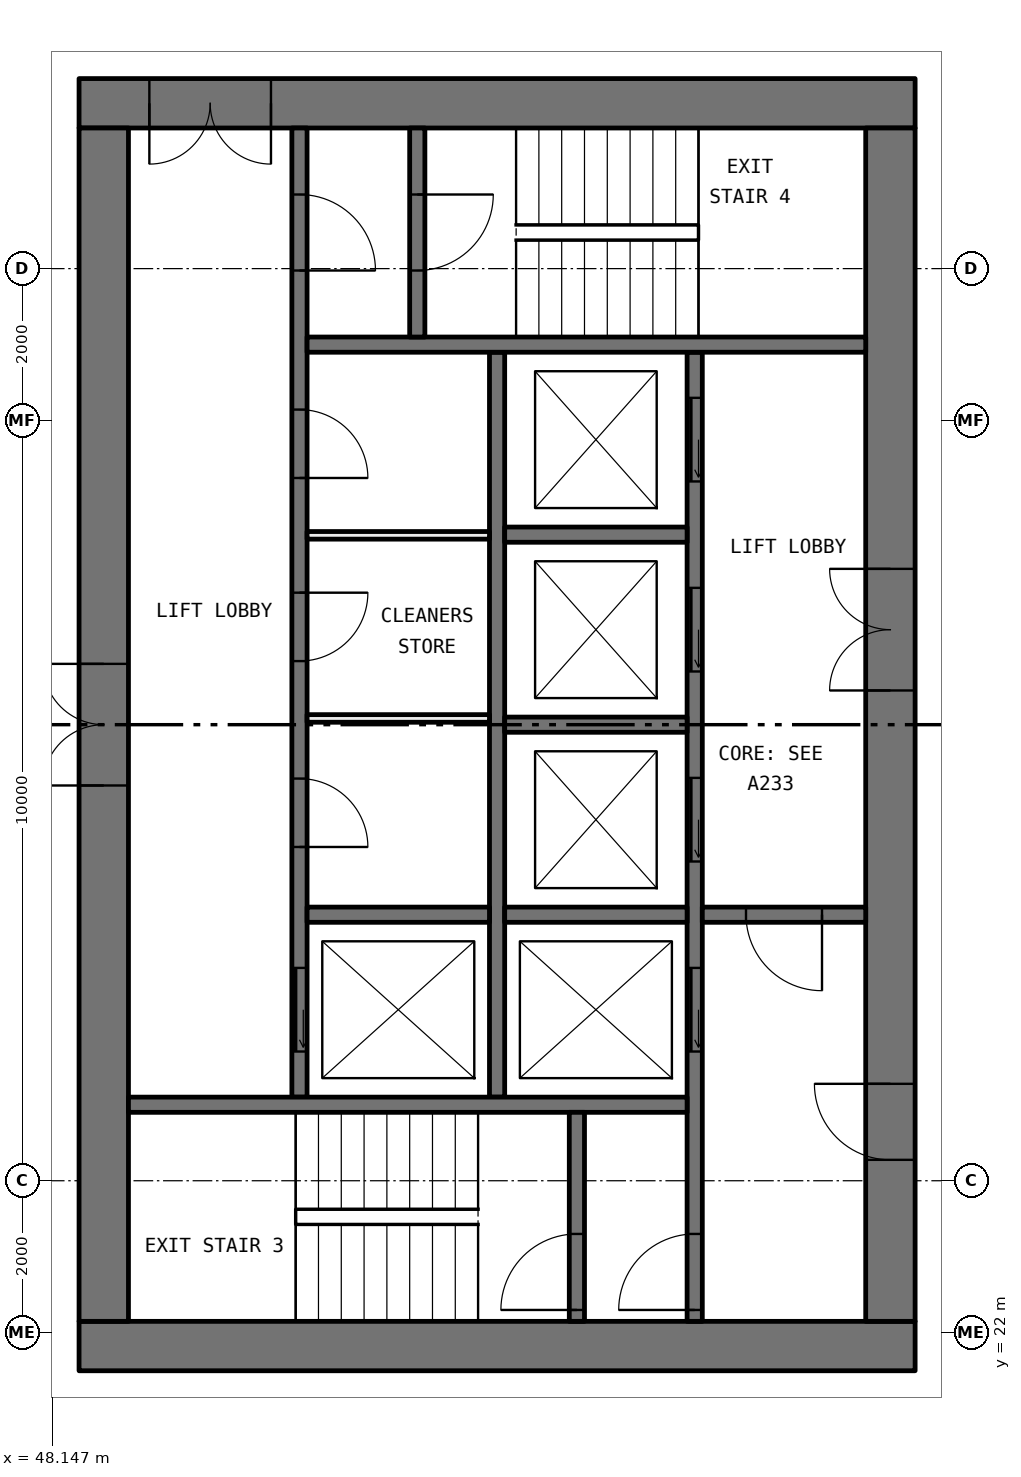
"""IFC4 building model, lengths in metres.
Left out: names, types, materials, properties, quantities, classifications, styles, units other than length and angle.
Written with IfcOpenShell. Run it as: python <this file> out.ifc"""

import sys

from ifc_helpers import new_model, si_unit, direction, frame, frame_2d, origin, place, context, subcontext, project, spatial, rectangle, extrude, element, fill, save


model = new_model("IFC4")
c1 = context("Model", 3, precision=1e-05, world=origin(), true_north=direction((0.0, 1.0)))
c2 = subcontext(c1, "Body", "Model", "MODEL_VIEW")
j1 = project(units=[si_unit("LENGTHUNIT", "METRE"), si_unit("PLANEANGLEUNIT", "RADIAN")], contexts=[c1])
p1 = place(None, origin())
s1 = spatial("IfcSite", under=j1, at=p1, CompositionType="ELEMENT")
p2 = place(p1, origin())
s2 = spatial("IfcBuilding", under=s1, at=p2, CompositionType="ELEMENT")
p3 = place(p2, frame((0.0, 0.0, 124.2)))
s3 = spatial("IfcBuildingStorey", under=s2, at=p3, CompositionType="ELEMENT", Elevation=124.2)
p4 = place(p3, frame((59.5, 21.825, 0.0), z_axis=(0.0, 0.0, 1.0), x_axis=(-1.0, 0.0, 0.0)))
e1 = element("IfcWall", 1, at=p4, inside=s3, PredefinedType="SHEAR", context=c2, shape_type="SweptSolid", body=[
    extrude(rectangle(XDim=11.0, YDim=0.65, at=frame_2d((5.5, 0.0))), origin(), (0.0, 0.0, 1.0), 3.05),
])
p5 = place(p3, frame((59.5, 38.175, 0.0), z_axis=(0.0, 0.0, 1.0), x_axis=(-1.0, 0.0, 0.0)))
e2 = element("IfcWall", 2, at=p5, inside=s3, PredefinedType="SHEAR", context=c2, shape_type="SweptSolid", body=[
    extrude(rectangle(XDim=11.0, YDim=0.65, at=frame_2d((5.5, 0.0))), origin(), (0.0, 0.0, 1.0), 3.05),
])
p6 = place(p5, frame((8.475, 0.0, 0.0)))
e3 = element("IfcOpeningElement", 3, at=p6, cuts=e2, PredefinedType="OPENING", context=c2, shape_type="SweptSolid", body=[
    extrude(rectangle(XDim=1.6, YDim=2.1, at=frame_2d((0.8, 1.05))), frame((0.0, 0.335, 0.0), z_axis=(0.0, -1.0, 0.0), x_axis=(1.0, 0.0, 0.0)), (0.0, 0.0, 1.0), 0.67),
])
p7 = place(p3, frame((59.175, 22.15, 0.0), z_axis=(0.0, 0.0, 1.0), x_axis=(0.0, 1.0, 0.0)))
e4 = element("IfcWall", 4, at=p7, inside=s3, PredefinedType="SHEAR", context=c2, shape_type="SweptSolid", body=[
    extrude(rectangle(XDim=15.7, YDim=0.65, at=frame_2d((7.85, 0.0))), origin(), (0.0, 0.0, 1.0), 3.05),
])
p8 = place(p7, frame((8.3, 0.0, 0.0)))
e5 = element("IfcOpeningElement", 5, at=p8, cuts=e4, PredefinedType="OPENING", context=c2, shape_type="SweptSolid", body=[
    extrude(rectangle(XDim=1.6, YDim=2.1, at=frame_2d((0.8, 1.05))), frame((0.0, 0.335, 0.0), z_axis=(0.0, -1.0, 0.0), x_axis=(1.0, 0.0, 0.0)), (0.0, 0.0, 1.0), 0.67),
])
p9 = place(p7, frame((2.125, 0.0, 0.0)))
e6 = element("IfcOpeningElement", 6, at=p9, cuts=e4, PredefinedType="OPENING", context=c2, shape_type="SweptSolid", body=[
    extrude(rectangle(XDim=1.0, YDim=2.1, at=frame_2d((0.5, 1.05))), frame((0.0, 0.335, 0.0), z_axis=(0.0, -1.0, 0.0), x_axis=(1.0, 0.0, 0.0)), (0.0, 0.0, 1.0), 0.67),
])
p10 = place(p3, frame((48.825, 22.15, 0.0), z_axis=(0.0, 0.0, 1.0), x_axis=(0.0, 1.0, 0.0)))
e7 = element("IfcWall", 7, at=p10, inside=s3, PredefinedType="SHEAR", context=c2, shape_type="SweptSolid", body=[
    extrude(rectangle(XDim=15.7, YDim=0.65, at=frame_2d((7.85, 0.0))), origin(), (0.0, 0.0, 1.0), 3.05),
])
p11 = place(p10, frame((7.05, 0.0, 0.0)))
e8 = element("IfcOpeningElement", 8, at=p11, cuts=e7, PredefinedType="OPENING", context=c2, shape_type="SweptSolid", body=[
    extrude(rectangle(XDim=1.6, YDim=2.1, at=frame_2d((0.8, 1.05))), frame((0.0, 0.335, 0.0), z_axis=(0.0, -1.0, 0.0), x_axis=(1.0, 0.0, 0.0)), (0.0, 0.0, 1.0), 0.67),
])
p12 = place(p3, frame((56.6, 22.15, 0.0), z_axis=(0.0, 0.0, 1.0), x_axis=(0.0, 1.0, 0.0)))
e9 = element("IfcWall", 9, at=p12, inside=s3, PredefinedType="SOLIDWALL", context=c2, shape_type="SweptSolid", body=[
    extrude(rectangle(XDim=12.75, YDim=0.2, at=frame_2d((6.375, 0.0))), origin(), (0.0, 0.0, 1.0), 3.05),
])
p13 = place(p12, frame((3.55, 0.0, 0.0)))
e10 = element("IfcOpeningElement", 10, at=p13, cuts=e9, PredefinedType="OPENING", context=c2, shape_type="SweptSolid", body=[
    extrude(rectangle(XDim=1.1, YDim=2.1, at=frame_2d((0.55, 1.05))), frame((0.0, 0.11, 0.0), z_axis=(0.0, -1.0, 0.0), x_axis=(1.0, 0.0, 0.0)), (0.0, 0.0, 1.0), 0.22),
])
p14 = place(p12, frame((6.05, 0.0, 0.0)))
e11 = element("IfcOpeningElement", 11, at=p14, cuts=e9, PredefinedType="OPENING", context=c2, shape_type="SweptSolid", body=[
    extrude(rectangle(XDim=1.1, YDim=2.1, at=frame_2d((0.55, 1.05))), frame((0.0, 0.11, 0.0), z_axis=(0.0, -1.0, 0.0), x_axis=(1.0, 0.0, 0.0)), (0.0, 0.0, 1.0), 0.22),
])
p15 = place(p12, frame((8.55, 0.0, 0.0)))
e12 = element("IfcOpeningElement", 12, at=p15, cuts=e9, PredefinedType="OPENING", context=c2, shape_type="SweptSolid", body=[
    extrude(rectangle(XDim=1.1, YDim=2.1, at=frame_2d((0.55, 1.05))), frame((0.0, 0.11, 0.0), z_axis=(0.0, -1.0, 0.0), x_axis=(1.0, 0.0, 0.0)), (0.0, 0.0, 1.0), 0.22),
])
p16 = place(p12, frame((11.05, 0.0, 0.0)))
e13 = element("IfcOpeningElement", 13, at=p16, cuts=e9, PredefinedType="OPENING", context=c2, shape_type="SweptSolid", body=[
    extrude(rectangle(XDim=1.1, YDim=2.1, at=frame_2d((0.55, 1.05))), frame((0.0, 0.11, 0.0), z_axis=(0.0, -1.0, 0.0), x_axis=(1.0, 0.0, 0.0)), (0.0, 0.0, 1.0), 0.22),
])
p17 = place(p12, frame((0.15, 0.0, 0.0)))
e14 = element("IfcOpeningElement", 14, at=p17, cuts=e9, PredefinedType="OPENING", context=c2, shape_type="SweptSolid", body=[
    extrude(rectangle(XDim=1.0, YDim=2.1, at=frame_2d((0.5, 1.05))), frame((0.0, 0.11, 0.0), z_axis=(0.0, -1.0, 0.0), x_axis=(1.0, 0.0, 0.0)), (0.0, 0.0, 1.0), 0.22),
])
p18 = place(p3, frame((51.4, 25.1, 0.0), z_axis=(0.0, 0.0, 1.0), x_axis=(0.0, 1.0, 0.0)))
e15 = element("IfcWall", 15, at=p18, inside=s3, PredefinedType="SOLIDWALL", context=c2, shape_type="SweptSolid", body=[
    extrude(rectangle(XDim=12.75, YDim=0.2, at=frame_2d((6.375, 0.0))), origin(), (0.0, 0.0, 1.0), 3.05),
])
p19 = place(p18, frame((0.6, 0.0, 0.0)))
e16 = element("IfcOpeningElement", 16, at=p19, cuts=e15, PredefinedType="OPENING", context=c2, shape_type="SweptSolid", body=[
    extrude(rectangle(XDim=1.1, YDim=2.1, at=frame_2d((0.55, 1.05))), frame((0.0, 0.11, 0.0), z_axis=(0.0, -1.0, 0.0), x_axis=(1.0, 0.0, 0.0)), (0.0, 0.0, 1.0), 0.22),
])
p20 = place(p18, frame((10.875, 0.0, 0.0)))
e17 = element("IfcOpeningElement", 17, at=p20, cuts=e15, PredefinedType="OPENING", context=c2, shape_type="SweptSolid", body=[
    extrude(rectangle(XDim=1.0, YDim=2.1, at=frame_2d((0.5, 1.05))), frame((0.0, 0.11, 0.0), z_axis=(0.0, -1.0, 0.0), x_axis=(1.0, 0.0, 0.0)), (0.0, 0.0, 1.0), 0.22),
])
p21 = place(p18, frame((3.291, 0.0, 0.0)))
e18 = element("IfcOpeningElement", 18, at=p21, cuts=e15, PredefinedType="OPENING", context=c2, shape_type="SweptSolid", body=[
    extrude(rectangle(XDim=0.9, YDim=2.1, at=frame_2d((0.45, 1.05))), frame((0.0, 0.11, 0.0), z_axis=(0.0, -1.0, 0.0), x_axis=(1.0, 0.0, 0.0)), (0.0, 0.0, 1.0), 0.22),
])
p22 = place(p18, frame((5.737, 0.0, 0.0)))
e19 = element("IfcOpeningElement", 19, at=p22, cuts=e15, PredefinedType="OPENING", context=c2, shape_type="SweptSolid", body=[
    extrude(rectangle(XDim=0.9, YDim=2.1, at=frame_2d((0.45, 1.05))), frame((0.0, 0.11, 0.0), z_axis=(0.0, -1.0, 0.0), x_axis=(1.0, 0.0, 0.0)), (0.0, 0.0, 1.0), 0.22),
])
p23 = place(p18, frame((8.146, 0.0, 0.0)))
e20 = element("IfcOpeningElement", 20, at=p23, cuts=e15, PredefinedType="OPENING", context=c2, shape_type="SweptSolid", body=[
    extrude(rectangle(XDim=0.9, YDim=2.1, at=frame_2d((0.45, 1.05))), frame((0.0, 0.11, 0.0), z_axis=(0.0, -1.0, 0.0), x_axis=(1.0, 0.0, 0.0)), (0.0, 0.0, 1.0), 0.22),
])
p24 = place(p3, frame((54.0, 25.1, 0.0), z_axis=(0.0, 0.0, 1.0), x_axis=(0.0, 1.0, 0.0)))
e21 = element("IfcWall", 21, at=p24, inside=s3, PredefinedType="SOLIDWALL", context=c2, shape_type="SweptSolid", body=[
    extrude(rectangle(XDim=9.8, YDim=0.2, at=frame_2d((4.9, 0.0))), origin(), (0.0, 0.0, 1.0), 3.05),
])
for number, where, z_axis, x_axis in (
    (22, (56.5, 25.0, 0.0), (0.0, 0.0, 1.0), (-1.0, 0.0, 0.0)),
    (23, (58.85, 35.0, 0.0), (0.0, 0.0, 1.0), (-1.0, 0.0, 0.0)),
):
    element("IfcWall", number, at=place(p3, frame(where, z_axis=z_axis, x_axis=x_axis)), inside=s3, PredefinedType="SOLIDWALL", context=c2, shape_type="SweptSolid", body=[
        extrude(rectangle(XDim=7.35, YDim=0.2, at=frame_2d((3.675, 0.0))), origin(), (0.0, 0.0, 1.0), 3.05),
    ])
p25 = place(p3, frame((58.85, 27.5, 0.0), z_axis=(0.0, 0.0, 1.0), x_axis=(-1.0, 0.0, 0.0)))
e24 = element("IfcWall", 24, at=p25, inside=s3, PredefinedType="SOLIDWALL", context=c2, shape_type="SweptSolid", body=[
    extrude(rectangle(XDim=2.15, YDim=0.2, at=frame_2d((1.075, 0.0))), origin(), (0.0, 0.0, 1.0), 3.05),
])
p26 = place(p25, frame((0.575, 0.0, 0.0)))
e25 = element("IfcOpeningElement", 25, at=p26, cuts=e24, PredefinedType="OPENING", context=c2, shape_type="SweptSolid", body=[
    extrude(rectangle(XDim=1.0, YDim=2.1, at=frame_2d((0.5, 1.05))), frame((0.0, 0.11, 0.0), z_axis=(0.0, -1.0, 0.0), x_axis=(1.0, 0.0, 0.0)), (0.0, 0.0, 1.0), 0.22),
])
p27 = place(p3, frame((55.05, 22.15, 0.0), z_axis=(0.0, 0.0, 1.0), x_axis=(0.0, 1.0, 0.0)))
e26 = element("IfcWall", 26, at=p27, inside=s3, PredefinedType="SOLIDWALL", context=c2, shape_type="SweptSolid", body=[
    extrude(rectangle(XDim=2.75, YDim=0.2, at=frame_2d((1.375, 0.0))), origin(), (0.0, 0.0, 1.0), 3.05),
])
p28 = place(p27, frame((0.15, 0.0, 0.0)))
e27 = element("IfcOpeningElement", 27, at=p28, cuts=e26, PredefinedType="OPENING", context=c2, shape_type="SweptSolid", body=[
    extrude(rectangle(XDim=1.0, YDim=2.1, at=frame_2d((0.5, 1.05))), frame((0.0, 0.11, 0.0), z_axis=(0.0, -1.0, 0.0), x_axis=(1.0, 0.0, 0.0)), (0.0, 0.0, 1.0), 0.22),
])
p29 = place(p3, frame((52.95, 35.1, 0.0), z_axis=(0.0, 0.0, 1.0), x_axis=(0.0, 1.0, 0.0)))
e28 = element("IfcWall", 28, at=p29, inside=s3, PredefinedType="SOLIDWALL", context=c2, shape_type="SweptSolid", body=[
    extrude(rectangle(XDim=2.75, YDim=0.2, at=frame_2d((1.375, 0.0))), origin(), (0.0, 0.0, 1.0), 3.05),
])
p30 = place(p29, frame((0.875, 0.0, 0.0)))
e29 = element("IfcOpeningElement", 29, at=p30, cuts=e28, PredefinedType="OPENING", context=c2, shape_type="SweptSolid", body=[
    extrude(rectangle(XDim=1.0, YDim=2.1, at=frame_2d((0.5, 1.05))), frame((0.0, 0.11, 0.0), z_axis=(0.0, -1.0, 0.0), x_axis=(1.0, 0.0, 0.0)), (0.0, 0.0, 1.0), 0.22),
])
for number, where, z_axis, x_axis in (
    (30, (56.5, 27.5, 0.0), (0.0, 0.0, 1.0), (-1.0, 0.0, 0.0)),
    (31, (56.5, 30.0, 0.0), (0.0, 0.0, 1.0), (-1.0, 0.0, 0.0)),
    (32, (56.5, 32.5, 0.0), (0.0, 0.0, 1.0), (-1.0, 0.0, 0.0)),
    (33, (53.9, 27.5, 0.0), (0.0, 0.0, 1.0), (-1.0, 0.0, 0.0)),
):
    element("IfcWall", number, at=place(p3, frame(where, z_axis=z_axis, x_axis=x_axis)), inside=s3, PredefinedType="SOLIDWALL", context=c2, shape_type="SweptSolid", body=[
        extrude(rectangle(XDim=2.4, YDim=0.2, at=frame_2d((1.2, 0.0))), origin(), (0.0, 0.0, 1.0), 3.05),
    ])
for number, where, z_axis, x_axis in (
    (34, (53.9, 30.082, 0.0), (0.0, 0.0, 1.0), (-1.0, 0.0, 0.0)),
    (35, (53.9, 32.491, 0.0), (0.0, 0.0, 1.0), (-1.0, 0.0, 0.0)),
):
    element("IfcWall", number, at=place(p3, frame(where, z_axis=z_axis, x_axis=x_axis)), inside=s3, PredefinedType="PARTITIONING", context=c2, shape_type="SweptSolid", body=[
        extrude(rectangle(XDim=2.4, YDim=0.1, at=frame_2d((1.2, 0.0))), origin(), (0.0, 0.0, 1.0), 3.05),
    ])
p31 = place(p19, origin())
e36 = element("IfcDoor", 36, at=p31, inside=s3, OperationType="SLIDING_TO_LEFT", PredefinedType="DOOR", context=c2, shape_type="SweptSolid", body=[
    extrude(rectangle(XDim=1.1, YDim=2.1, at=frame_2d((0.55, 1.05))), frame((0.0, 0.025, 0.0), z_axis=(0.0, -1.0, 0.0), x_axis=(1.0, 0.0, 0.0)), (0.0, 0.0, 1.0), 0.05),
])
fill(e16, e36)
p32 = place(p13, origin())
e37 = element("IfcDoor", 37, at=p32, inside=s3, OperationType="SLIDING_TO_LEFT", PredefinedType="DOOR", context=c2, shape_type="SweptSolid", body=[
    extrude(rectangle(XDim=1.1, YDim=2.1, at=frame_2d((0.55, 1.05))), frame((0.0, 0.025, 0.0), z_axis=(0.0, -1.0, 0.0), x_axis=(1.0, 0.0, 0.0)), (0.0, 0.0, 1.0), 0.05),
])
fill(e10, e37)
p33 = place(p14, origin())
e38 = element("IfcDoor", 38, at=p33, inside=s3, OperationType="SLIDING_TO_LEFT", PredefinedType="DOOR", context=c2, shape_type="SweptSolid", body=[
    extrude(rectangle(XDim=1.1, YDim=2.1, at=frame_2d((0.55, 1.05))), frame((0.0, 0.025, 0.0), z_axis=(0.0, -1.0, 0.0), x_axis=(1.0, 0.0, 0.0)), (0.0, 0.0, 1.0), 0.05),
])
fill(e11, e38)
p34 = place(p15, origin())
e39 = element("IfcDoor", 39, at=p34, inside=s3, OperationType="SLIDING_TO_LEFT", PredefinedType="DOOR", context=c2, shape_type="SweptSolid", body=[
    extrude(rectangle(XDim=1.1, YDim=2.1, at=frame_2d((0.55, 1.05))), frame((0.0, 0.025, 0.0), z_axis=(0.0, -1.0, 0.0), x_axis=(1.0, 0.0, 0.0)), (0.0, 0.0, 1.0), 0.05),
])
fill(e12, e39)
p35 = place(p16, origin())
e40 = element("IfcDoor", 40, at=p35, inside=s3, OperationType="SLIDING_TO_LEFT", PredefinedType="DOOR", context=c2, shape_type="SweptSolid", body=[
    extrude(rectangle(XDim=1.1, YDim=2.1, at=frame_2d((0.55, 1.05))), frame((0.0, 0.025, 0.0), z_axis=(0.0, -1.0, 0.0), x_axis=(1.0, 0.0, 0.0)), (0.0, 0.0, 1.0), 0.05),
])
fill(e13, e40)
p36 = place(p28, origin())
e41 = element("IfcDoor", 41, at=p36, inside=s3, OperationType="SINGLE_SWING_RIGHT", PredefinedType="DOOR", context=c2, shape_type="SweptSolid", body=[
    extrude(rectangle(XDim=1.0, YDim=2.1, at=frame_2d((0.5, 1.05))), frame((0.0, 0.025, 0.0), z_axis=(0.0, -1.0, 0.0), x_axis=(1.0, 0.0, 0.0)), (0.0, 0.0, 1.0), 0.05),
])
fill(e27, e41)
p37 = place(p17, origin())
e42 = element("IfcDoor", 42, at=p37, inside=s3, OperationType="SINGLE_SWING_RIGHT", PredefinedType="DOOR", context=c2, shape_type="SweptSolid", body=[
    extrude(rectangle(XDim=1.0, YDim=2.1, at=frame_2d((0.5, 1.05))), frame((0.0, 0.025, 0.0), z_axis=(0.0, -1.0, 0.0), x_axis=(1.0, 0.0, 0.0)), (0.0, 0.0, 1.0), 0.05),
])
fill(e14, e42)
p38 = place(p20, frame((1.0, 0.0, 0.0), x_axis=(-1.0, 0.0, 0.0)))
e43 = element("IfcDoor", 43, at=p38, inside=s3, OperationType="SINGLE_SWING_LEFT", PredefinedType="DOOR", context=c2, shape_type="SweptSolid", body=[
    extrude(rectangle(XDim=1.0, YDim=2.1, at=frame_2d((0.5, 1.05))), frame((0.0, 0.025, 0.0), z_axis=(0.0, -1.0, 0.0), x_axis=(1.0, 0.0, 0.0)), (0.0, 0.0, 1.0), 0.05),
])
fill(e17, e43)
p39 = place(p30, frame((1.0, 0.0, 0.0), x_axis=(-1.0, 0.0, 0.0)))
e44 = element("IfcDoor", 44, at=p39, inside=s3, OperationType="SINGLE_SWING_RIGHT", PredefinedType="DOOR", context=c2, shape_type="SweptSolid", body=[
    extrude(rectangle(XDim=1.0, YDim=2.1, at=frame_2d((0.5, 1.05))), frame((0.0, 0.025, 0.0), z_axis=(0.0, -1.0, 0.0), x_axis=(1.0, 0.0, 0.0)), (0.0, 0.0, 1.0), 0.05),
])
fill(e29, e44)
p40 = place(p26, origin())
e45 = element("IfcDoor", 45, at=p40, inside=s3, OperationType="SINGLE_SWING_RIGHT", PredefinedType="DOOR", context=c2, shape_type="SweptSolid", body=[
    extrude(rectangle(XDim=1.0, YDim=2.1, at=frame_2d((0.5, 1.05))), frame((0.0, 0.025, 0.0), z_axis=(0.0, -1.0, 0.0), x_axis=(1.0, 0.0, 0.0)), (0.0, 0.0, 1.0), 0.05),
])
fill(e25, e45)
p41 = place(p8, origin())
e46 = element("IfcDoor", 46, at=p41, inside=s3, OperationType="DOUBLE_DOOR_SINGLE_SWING", PredefinedType="DOOR", context=c2, shape_type="SweptSolid", body=[
    extrude(rectangle(XDim=1.6, YDim=2.1, at=frame_2d((0.8, 1.05))), frame((0.0, 0.025, 0.0), z_axis=(0.0, -1.0, 0.0), x_axis=(1.0, 0.0, 0.0)), (0.0, 0.0, 1.0), 0.05),
])
fill(e5, e46)
p42 = place(p9, origin())
e47 = element("IfcDoor", 47, at=p42, inside=s3, OperationType="SINGLE_SWING_LEFT", PredefinedType="DOOR", context=c2, shape_type="SweptSolid", body=[
    extrude(rectangle(XDim=1.0, YDim=2.1, at=frame_2d((0.5, 1.05))), frame((0.0, 0.025, 0.0), z_axis=(0.0, -1.0, 0.0), x_axis=(1.0, 0.0, 0.0)), (0.0, 0.0, 1.0), 0.05),
])
fill(e6, e47)
p43 = place(p6, origin())
e48 = element("IfcDoor", 48, at=p43, inside=s3, OperationType="DOUBLE_DOOR_SINGLE_SWING", PredefinedType="DOOR", context=c2, shape_type="SweptSolid", body=[
    extrude(rectangle(XDim=1.6, YDim=2.1, at=frame_2d((0.8, 1.05))), frame((0.0, 0.025, 0.0), z_axis=(0.0, -1.0, 0.0), x_axis=(1.0, 0.0, 0.0)), (0.0, 0.0, 1.0), 0.05),
])
fill(e3, e48)
p44 = place(p11, origin())
e49 = element("IfcDoor", 49, at=p44, inside=s3, OperationType="DOUBLE_DOOR_SINGLE_SWING", PredefinedType="DOOR", context=c2, shape_type="SweptSolid", body=[
    extrude(rectangle(XDim=1.6, YDim=2.1, at=frame_2d((0.8, 1.05))), frame((0.0, 0.025, 0.0), z_axis=(0.0, -1.0, 0.0), x_axis=(1.0, 0.0, 0.0)), (0.0, 0.0, 1.0), 0.05),
])
fill(e8, e49)
p45 = place(p21, frame((0.9, 0.0, 0.0), x_axis=(-1.0, 0.0, 0.0)))
e50 = element("IfcDoor", 50, at=p45, inside=s3, OperationType="SINGLE_SWING_LEFT", PredefinedType="DOOR", context=c2, shape_type="SweptSolid", body=[
    extrude(rectangle(XDim=0.9, YDim=2.1, at=frame_2d((0.45, 1.05))), frame((0.0, 0.025, 0.0), z_axis=(0.0, -1.0, 0.0), x_axis=(1.0, 0.0, 0.0)), (0.0, 0.0, 1.0), 0.05),
])
fill(e18, e50)
p46 = place(p22, frame((0.9, 0.0, 0.0), x_axis=(-1.0, 0.0, 0.0)))
e51 = element("IfcDoor", 51, at=p46, inside=s3, OperationType="SINGLE_SWING_RIGHT", PredefinedType="DOOR", context=c2, shape_type="SweptSolid", body=[
    extrude(rectangle(XDim=0.9, YDim=2.1, at=frame_2d((0.45, 1.05))), frame((0.0, 0.025, 0.0), z_axis=(0.0, -1.0, 0.0), x_axis=(1.0, 0.0, 0.0)), (0.0, 0.0, 1.0), 0.05),
])
fill(e19, e51)
p47 = place(p23, frame((0.9, 0.0, 0.0), x_axis=(-1.0, 0.0, 0.0)))
e52 = element("IfcDoor", 52, at=p47, inside=s3, OperationType="SINGLE_SWING_LEFT", PredefinedType="DOOR", context=c2, shape_type="SweptSolid", body=[
    extrude(rectangle(XDim=0.9, YDim=2.1, at=frame_2d((0.45, 1.05))), frame((0.0, 0.025, 0.0), z_axis=(0.0, -1.0, 0.0), x_axis=(1.0, 0.0, 0.0)), (0.0, 0.0, 1.0), 0.05),
])
fill(e20, e52)
save(model, sys.argv[1])
